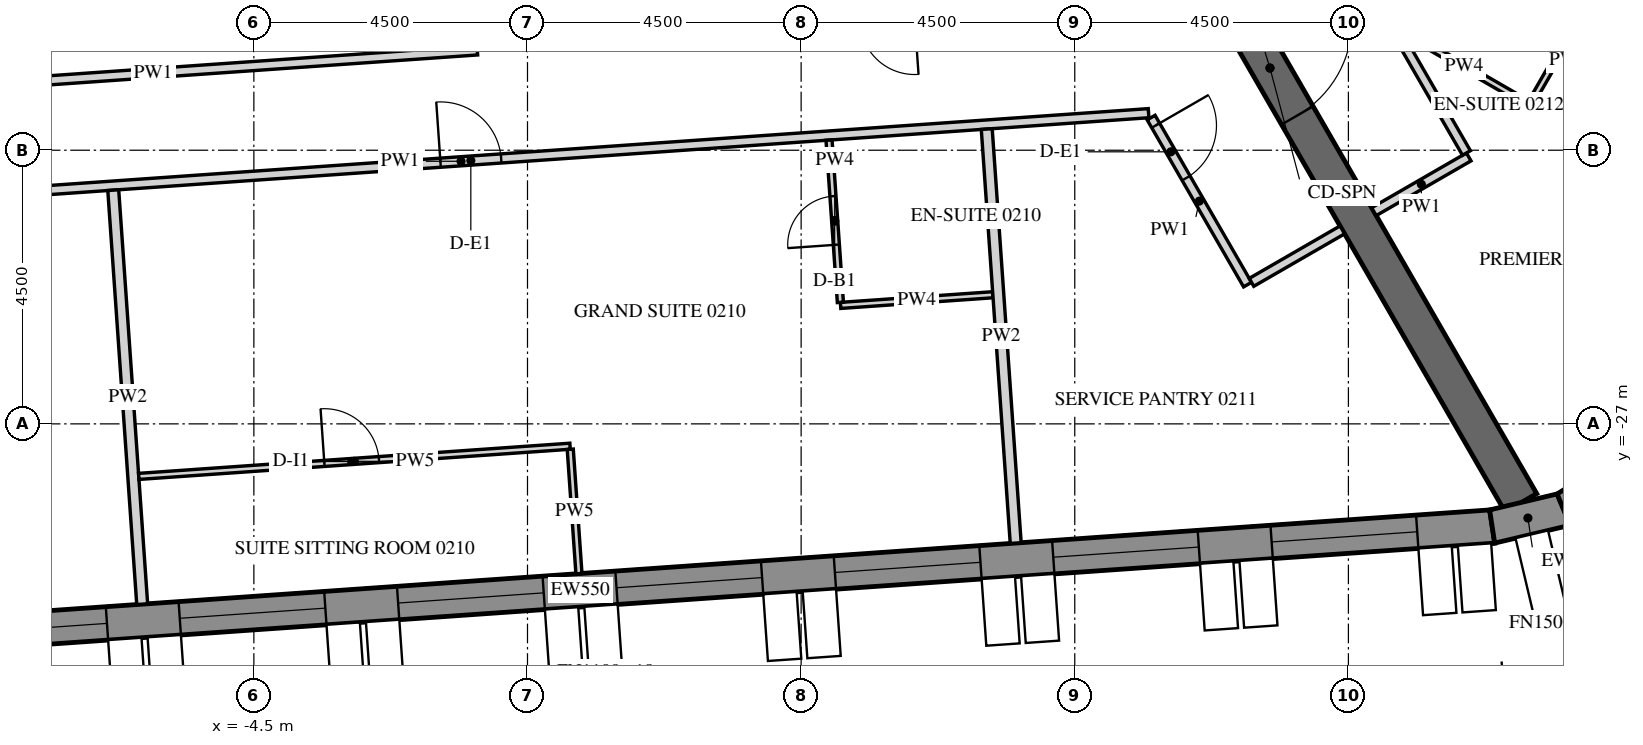
"""IFC4 building model, lengths in metres.
Left out: names, types, materials, properties, quantities, classifications, styles, units other than length and angle.
Written with IfcOpenShell. Run it as: python <this file> out.ifc"""

import sys

from ifc_helpers import new_model, si_unit, direction, frame, frame_2d, origin, place, context, subcontext, project, spatial, polyline, rectangle, outline, extrude, element, fill, save


model = new_model("IFC4")
c1 = context("Model", 3, precision=1e-05, world=origin(), true_north=direction((0.0, 1.0)))
c2 = subcontext(c1, "Body", "Model", "MODEL_VIEW")
j1 = project(units=[si_unit("LENGTHUNIT", "METRE"), si_unit("PLANEANGLEUNIT", "RADIAN")], contexts=[c1])
p1 = place(None, origin())
s1 = spatial("IfcSite", under=j1, at=p1, CompositionType="ELEMENT")
p2 = place(p1, origin())
s2 = spatial("IfcBuilding", under=s1, at=p2, CompositionType="ELEMENT")
p3 = place(p2, frame((0.0, 0.0, 49.2)))
s3 = spatial("IfcBuildingStorey", under=s2, at=p3, CompositionType="ELEMENT", Elevation=49.2)
p4 = place(p3, frame((-14.134, -30.786, -0.15), z_axis=(0.0, 0.0, 1.0), x_axis=(0.997564037441, 0.069756657061, 0.0)))
e1 = element("IfcWall", 1, at=p4, inside=s3, PredefinedType="SOLIDWALL", context=c2, shape_type="SweptSolid", body=[
    extrude(outline(polyline([(-0.026, -0.275), (30.094, -0.275), (30.049, 0.275), (0.026, 0.275), (-0.026, -0.275)])), origin(), (0.0, 0.0, 1.0), 3.9),
])
p5 = place(p4, frame((1.236, 0.0, 1.05)))
e2 = element("IfcOpeningElement", 2, at=p5, cuts=e1, PredefinedType="OPENING", context=c2, shape_type="SweptSolid", body=[
    extrude(rectangle(XDim=2.4, YDim=2.4, at=frame_2d((1.2, 1.2))), frame((0.0, 0.285, 0.0), z_axis=(0.0, -1.0, 0.0), x_axis=(1.0, 0.0, 0.0)), (0.0, 0.0, 1.0), 0.57),
])
p6 = place(p4, frame((4.835, 0.0, 1.05)))
e3 = element("IfcOpeningElement", 3, at=p6, cuts=e1, PredefinedType="OPENING", context=c2, shape_type="SweptSolid", body=[
    extrude(rectangle(XDim=2.4, YDim=2.4, at=frame_2d((1.2, 1.2))), frame((0.0, 0.285, 0.0), z_axis=(0.0, -1.0, 0.0), x_axis=(1.0, 0.0, 0.0)), (0.0, 0.0, 1.0), 0.57),
])
p7 = place(p4, frame((8.436, 0.0, 1.05)))
e4 = element("IfcOpeningElement", 4, at=p7, cuts=e1, PredefinedType="OPENING", context=c2, shape_type="SweptSolid", body=[
    extrude(rectangle(XDim=2.4, YDim=2.4, at=frame_2d((1.2, 1.2))), frame((0.0, 0.285, 0.0), z_axis=(0.0, -1.0, 0.0), x_axis=(1.0, 0.0, 0.0)), (0.0, 0.0, 1.0), 0.57),
])
p8 = place(p4, frame((12.035, 0.0, 1.05)))
e5 = element("IfcOpeningElement", 5, at=p8, cuts=e1, PredefinedType="OPENING", context=c2, shape_type="SweptSolid", body=[
    extrude(rectangle(XDim=2.4, YDim=2.4, at=frame_2d((1.2, 1.2))), frame((0.0, 0.285, 0.0), z_axis=(0.0, -1.0, 0.0), x_axis=(1.0, 0.0, 0.0)), (0.0, 0.0, 1.0), 0.57),
])
p9 = place(p4, frame((15.635, 0.0, 1.05)))
e6 = element("IfcOpeningElement", 6, at=p9, cuts=e1, PredefinedType="OPENING", context=c2, shape_type="SweptSolid", body=[
    extrude(rectangle(XDim=2.4, YDim=2.4, at=frame_2d((1.2, 1.2))), frame((0.0, 0.285, 0.0), z_axis=(0.0, -1.0, 0.0), x_axis=(1.0, 0.0, 0.0)), (0.0, 0.0, 1.0), 0.57),
])
p10 = place(p4, frame((19.236, 0.0, 1.05)))
e7 = element("IfcOpeningElement", 7, at=p10, cuts=e1, PredefinedType="OPENING", context=c2, shape_type="SweptSolid", body=[
    extrude(rectangle(XDim=2.4, YDim=2.4, at=frame_2d((1.2, 1.2))), frame((0.0, 0.285, 0.0), z_axis=(0.0, -1.0, 0.0), x_axis=(1.0, 0.0, 0.0)), (0.0, 0.0, 1.0), 0.57),
])
p11 = place(p4, frame((22.835, 0.0, 1.05)))
e8 = element("IfcOpeningElement", 8, at=p11, cuts=e1, PredefinedType="OPENING", context=c2, shape_type="SweptSolid", body=[
    extrude(rectangle(XDim=2.4, YDim=2.4, at=frame_2d((1.2, 1.2))), frame((0.0, 0.285, 0.0), z_axis=(0.0, -1.0, 0.0), x_axis=(1.0, 0.0, 0.0)), (0.0, 0.0, 1.0), 0.57),
])
p12 = place(p4, frame((26.436, 0.0, 1.05)))
e9 = element("IfcOpeningElement", 9, at=p12, cuts=e1, PredefinedType="OPENING", context=c2, shape_type="SweptSolid", body=[
    extrude(rectangle(XDim=2.4, YDim=2.4, at=frame_2d((1.2, 1.2))), frame((0.0, 0.285, 0.0), z_axis=(0.0, -1.0, 0.0), x_axis=(1.0, 0.0, 0.0)), (0.0, 0.0, 1.0), 0.57),
])
p13 = place(p3, frame((15.864, -28.688, -0.15), z_axis=(0.0, 0.0, 1.0), x_axis=(0.973063591128, 0.230536868247, 0.0)))
e10 = element("IfcWall", 10, at=p13, inside=s3, PredefinedType="SOLIDWALL", context=c2, shape_type="SweptSolid", body=[
    extrude(outline(polyline([(-0.022, -0.275), (1.253, -0.275), (1.163, 0.275), (0.022, 0.275), (-0.022, -0.275)])), origin(), (0.0, 0.0, 1.0), 3.9),
])
p14 = place(p3, frame((17.04, -28.41, -0.15), z_axis=(0.0, 0.0, 1.0), x_axis=(0.847952888306, 0.530071598195, 0.0)))
e11 = element("IfcWall", 11, at=p14, inside=s3, PredefinedType="SOLIDWALL", context=c2, shape_type="SweptSolid", body=[
    extrude(outline(polyline([(-0.045, -0.275), (1.253, -0.275), (1.163, 0.275), (0.045, 0.275), (-0.045, -0.275)])), origin(), (0.0, 0.0, 1.0), 3.9),
])
p15 = place(p3, frame((8.083, -14.0, -0.15), z_axis=(0.0, 0.0, 1.0), x_axis=(0.499997680643, -0.866026742862, 0.0)))
e12 = element("IfcWall", 12, at=p15, inside=s3, PredefinedType="SHEAR", context=c2, shape_type="SweptSolid", body=[
    extrude(rectangle(XDim=16.509, YDim=0.6, at=frame_2d((8.254, 0.0))), origin(), (0.0, 0.0, 1.0), 3.9),
])
p16 = place(p15, frame((7.354, 0.0, 0.15)))
e13 = element("IfcOpeningElement", 13, at=p16, cuts=e12, PredefinedType="OPENING", context=c2, shape_type="SweptSolid", body=[
    extrude(rectangle(XDim=1.8, YDim=2.4, at=frame_2d((0.9, 1.2))), frame((0.0, 0.31, 0.0), z_axis=(0.0, -1.0, 0.0), x_axis=(1.0, 0.0, 0.0)), (0.0, 0.0, 1.0), 0.62),
])
p17 = place(p3, frame((-12.4, -23.472, 0.0), z_axis=(0.0, 0.0, 1.0), x_axis=(0.997564133303, 0.069755286163, 0.0)))
e14 = element("IfcWall", 14, at=p17, inside=s3, PredefinedType="PARTITIONING", context=c2, shape_type="SweptSolid", body=[
    extrude(rectangle(XDim=22.669, YDim=0.15, at=frame_2d((11.334, 0.0))), origin(), (0.0, 0.0, 1.0), 2.988),
])
p18 = place(p17, frame((3.556, 0.0, 0.0)))
e15 = element("IfcOpeningElement", 15, at=p18, cuts=e14, PredefinedType="OPENING", context=c2, shape_type="SweptSolid", body=[
    extrude(rectangle(XDim=1.0, YDim=2.1, at=frame_2d((0.5, 1.05))), frame((0.0, 0.085, 0.0), z_axis=(0.0, -1.0, 0.0), x_axis=(1.0, 0.0, 0.0)), (0.0, 0.0, 1.0), 0.17),
])
p19 = place(p17, frame((10.996, 0.0, 0.0)))
e16 = element("IfcOpeningElement", 16, at=p19, cuts=e14, PredefinedType="OPENING", context=c2, shape_type="SweptSolid", body=[
    extrude(rectangle(XDim=1.0, YDim=2.1, at=frame_2d((0.5, 1.05))), frame((0.0, 0.085, 0.0), z_axis=(0.0, -1.0, 0.0), x_axis=(1.0, 0.0, 0.0)), (0.0, 0.0, 1.0), 0.17),
])
p20 = place(p3, frame((10.256, -21.963, 0.0), z_axis=(0.0, 0.0, 1.0), x_axis=(0.499980071345, -0.866036909293, 0.0)))
e17 = element("IfcWall", 17, at=p20, inside=s3, PredefinedType="PARTITIONING", context=c2, shape_type="SweptSolid", body=[
    extrude(rectangle(XDim=3.172, YDim=0.15, at=frame_2d((1.586, 0.0))), origin(), (0.0, 0.0, 1.0), 2.988),
])
p21 = place(p20, frame((0.15, 0.0, 0.0)))
e18 = element("IfcOpeningElement", 18, at=p21, cuts=e17, PredefinedType="OPENING", context=c2, shape_type="SweptSolid", body=[
    extrude(rectangle(XDim=1.0, YDim=2.1, at=frame_2d((0.5, 1.05))), frame((0.0, 0.085, 0.0), z_axis=(0.0, -1.0, 0.0), x_axis=(1.0, 0.0, 0.0)), (0.0, 0.0, 1.0), 0.17),
])
p22 = place(p3, frame((11.906, -24.673, 0.0), z_axis=(0.0, 0.0, 1.0), x_axis=(0.866013532718, 0.500020560727, 0.0)))
e19 = element("IfcWall", 19, at=p22, inside=s3, PredefinedType="PARTITIONING", context=c2, shape_type="SweptSolid", body=[
    extrude(rectangle(XDim=1.725, YDim=0.15, at=frame_2d((0.863, 0.0))), origin(), (0.0, 0.0, 1.0), 2.988),
])
p23 = place(p3, frame((-0.825, -20.858, 0.0), z_axis=(0.0, 0.0, 1.0), x_axis=(-0.997563801863, -0.069760025895, 0.0)))
e20 = element("IfcWall", 20, at=p23, inside=s3, PredefinedType="PARTITIONING", context=c2, shape_type="SweptSolid", body=[
    extrude(rectangle(XDim=10.688, YDim=0.15, at=frame_2d((5.344, 0.0))), origin(), (0.0, 0.0, 1.0), 2.988),
])
p24 = place(p3, frame((13.92, -23.51, 0.0), z_axis=(0.0, 0.0, 1.0), x_axis=(0.866047807691, 0.499961193289, 0.0)))
e21 = element("IfcWall", 21, at=p24, inside=s3, PredefinedType="PARTITIONING", context=c2, shape_type="SweptSolid", body=[
    extrude(rectangle(XDim=1.8, YDim=0.15, at=frame_2d((0.9, 0.0))), origin(), (0.0, 0.0, 1.0), 2.988),
])
p25 = place(p3, frame((15.441, -22.545, 0.0), z_axis=(0.0, 0.0, 1.0), x_axis=(-0.500013622142, 0.866017538894, 0.0)))
e22 = element("IfcWall", 22, at=p25, inside=s3, PredefinedType="PARTITIONING", context=c2, shape_type="SweptSolid", body=[
    extrude(rectangle(XDim=2.419, YDim=0.15, at=frame_2d((1.21, 0.0))), origin(), (0.0, 0.0, 1.0), 2.988),
])
p26 = place(p3, frame((-6.336, -29.965, 0.0), z_axis=(0.0, 0.0, 1.0), x_axis=(-0.069790326764, 0.997561682449, 0.0)))
e23 = element("IfcWall", 23, at=p26, inside=s3, PredefinedType="PARTITIONING", context=c2, shape_type="SweptSolid", body=[
    extrude(rectangle(XDim=6.825, YDim=0.18, at=frame_2d((3.413, 0.0))), origin(), (0.0, 0.0, 1.0), 2.988),
])
p27 = place(p3, frame((7.653, -24.877, 0.0), z_axis=(0.0, 0.0, 1.0), x_axis=(-0.997565196586, -0.069740078583, 0.0)))
e24 = element("IfcWall", 24, at=p27, inside=s3, PredefinedType="PARTITIONING", context=c2, shape_type="SweptSolid", body=[
    extrude(rectangle(XDim=2.51, YDim=0.1, at=frame_2d((1.255, 0.0))), origin(), (0.0, 0.0, 1.0), 2.988),
])
p28 = place(p3, frame((5.146, -25.002, 0.0), z_axis=(0.0, 0.0, 1.0), x_axis=(-0.069729221413, 0.997565955554, 0.0)))
e25 = element("IfcWall", 25, at=p28, inside=s3, PredefinedType="PARTITIONING", context=c2, shape_type="SweptSolid", body=[
    extrude(rectangle(XDim=2.675, YDim=0.1, at=frame_2d((1.337, 0.0))), origin(), (0.0, 0.0, 1.0), 2.988),
])
p29 = place(p28, frame((0.95, 0.0, 0.0)))
e26 = element("IfcOpeningElement", 26, at=p29, cuts=e25, PredefinedType="OPENING", context=c2, shape_type="SweptSolid", body=[
    extrude(rectangle(XDim=0.8, YDim=2.1, at=frame_2d((0.4, 1.05))), frame((0.0, 0.06, 0.0), z_axis=(0.0, -1.0, 0.0), x_axis=(1.0, 0.0, 0.0)), (0.0, 0.0, 1.0), 0.12),
])
p30 = place(p3, frame((-6.393, -27.864, 0.0), z_axis=(0.0, 0.0, 1.0), x_axis=(0.997565277642, 0.069738919141, 0.0)))
e27 = element("IfcWall", 27, at=p30, inside=s3, PredefinedType="PARTITIONING", context=c2, shape_type="SweptSolid", body=[
    extrude(rectangle(XDim=7.11, YDim=0.1, at=frame_2d((3.555, 0.0))), origin(), (0.0, 0.0, 1.0), 2.988),
])
p31 = place(p30, frame((3.06, 0.0, 0.0)))
e28 = element("IfcOpeningElement", 28, at=p31, cuts=e27, PredefinedType="OPENING", context=c2, shape_type="SweptSolid", body=[
    extrude(rectangle(XDim=0.9, YDim=2.1, at=frame_2d((0.45, 1.05))), frame((0.0, 0.06, 0.0), z_axis=(0.0, -1.0, 0.0), x_axis=(1.0, 0.0, 0.0)), (0.0, 0.0, 1.0), 0.12),
])
p32 = place(p3, frame((0.703, -27.418, 0.0), z_axis=(0.0, 0.0, 1.0), x_axis=(0.069791202247, -0.997561621199, 0.0)))
e29 = element("IfcWall", 29, at=p32, inside=s3, PredefinedType="PARTITIONING", context=c2, shape_type="SweptSolid", body=[
    extrude(rectangle(XDim=2.05, YDim=0.1, at=frame_2d((1.025, 0.0))), origin(), (0.0, 0.0, 1.0), 2.988),
])
p33 = place(p3, frame((8.029, -28.96, 0.0), z_axis=(0.0, 0.0, 1.0), x_axis=(-0.069754729296, 0.997564172242, 0.0)))
e30 = element("IfcWall", 30, at=p33, inside=s3, PredefinedType="PARTITIONING", context=c2, shape_type="SweptSolid", body=[
    extrude(rectangle(XDim=6.825, YDim=0.18, at=frame_2d((3.413, 0.0))), origin(), (0.0, 0.0, 1.0), 2.988),
])
p34 = place(p3, frame((17.758, -19.542, 0.0), z_axis=(0.0, 0.0, 1.0), x_axis=(-0.499990435942, -0.866030925526, 0.0)))
e31 = element("IfcWall", 31, at=p34, inside=s3, PredefinedType="PARTITIONING", context=c2, shape_type="SweptSolid", body=[
    extrude(rectangle(XDim=2.55, YDim=0.1, at=frame_2d((1.275, 0.0))), origin(), (0.0, 0.0, 1.0), 2.988),
])
p35 = place(p3, frame((16.44, -21.725, 0.0), z_axis=(0.0, 0.0, 1.0), x_axis=(-0.865980596518, 0.500077600433, 0.0)))
e32 = element("IfcWall", 32, at=p35, inside=s3, PredefinedType="PARTITIONING", context=c2, shape_type="SweptSolid", body=[
    extrude(rectangle(XDim=2.4, YDim=0.1, at=frame_2d((1.2, 0.0))), origin(), (0.0, 0.0, 1.0), 2.988),
])
p36 = place(p6, frame((0.0, 0.205, 0.0)))
e33 = element("IfcWindow", 33, at=p36, inside=s3, PartitioningType="DOUBLE_PANEL_VERTICAL", PredefinedType="WINDOW", context=c2, shape_type="SweptSolid", body=[
    extrude(rectangle(XDim=2.4, YDim=2.4, at=frame_2d((1.2, 1.2))), frame((0.0, 0.03, 0.0), z_axis=(0.0, -1.0, 0.0), x_axis=(1.0, 0.0, 0.0)), (0.0, 0.0, 1.0), 0.06),
])
fill(e3, e33)
p37 = place(p7, frame((0.0, 0.205, 0.0)))
e34 = element("IfcWindow", 34, at=p37, inside=s3, PartitioningType="DOUBLE_PANEL_VERTICAL", PredefinedType="WINDOW", context=c2, shape_type="SweptSolid", body=[
    extrude(rectangle(XDim=2.4, YDim=2.4, at=frame_2d((1.2, 1.2))), frame((0.0, 0.03, 0.0), z_axis=(0.0, -1.0, 0.0), x_axis=(1.0, 0.0, 0.0)), (0.0, 0.0, 1.0), 0.06),
])
fill(e4, e34)
p38 = place(p8, frame((0.0, 0.205, 0.0)))
e35 = element("IfcWindow", 35, at=p38, inside=s3, PartitioningType="DOUBLE_PANEL_VERTICAL", PredefinedType="WINDOW", context=c2, shape_type="SweptSolid", body=[
    extrude(rectangle(XDim=2.4, YDim=2.4, at=frame_2d((1.2, 1.2))), frame((0.0, 0.03, 0.0), z_axis=(0.0, -1.0, 0.0), x_axis=(1.0, 0.0, 0.0)), (0.0, 0.0, 1.0), 0.06),
])
fill(e5, e35)
p39 = place(p9, frame((0.0, 0.205, 0.0)))
e36 = element("IfcWindow", 36, at=p39, inside=s3, PartitioningType="DOUBLE_PANEL_VERTICAL", PredefinedType="WINDOW", context=c2, shape_type="SweptSolid", body=[
    extrude(rectangle(XDim=2.4, YDim=2.4, at=frame_2d((1.2, 1.2))), frame((0.0, 0.03, 0.0), z_axis=(0.0, -1.0, 0.0), x_axis=(1.0, 0.0, 0.0)), (0.0, 0.0, 1.0), 0.06),
])
fill(e6, e36)
p40 = place(p10, frame((0.0, 0.205, 0.0)))
e37 = element("IfcWindow", 37, at=p40, inside=s3, PartitioningType="DOUBLE_PANEL_VERTICAL", PredefinedType="WINDOW", context=c2, shape_type="SweptSolid", body=[
    extrude(rectangle(XDim=2.4, YDim=2.4, at=frame_2d((1.2, 1.2))), frame((0.0, 0.03, 0.0), z_axis=(0.0, -1.0, 0.0), x_axis=(1.0, 0.0, 0.0)), (0.0, 0.0, 1.0), 0.06),
])
fill(e7, e37)
p41 = place(p11, frame((0.0, 0.205, 0.0)))
e38 = element("IfcWindow", 38, at=p41, inside=s3, PartitioningType="DOUBLE_PANEL_VERTICAL", PredefinedType="WINDOW", context=c2, shape_type="SweptSolid", body=[
    extrude(rectangle(XDim=2.4, YDim=2.4, at=frame_2d((1.2, 1.2))), frame((0.0, 0.03, 0.0), z_axis=(0.0, -1.0, 0.0), x_axis=(1.0, 0.0, 0.0)), (0.0, 0.0, 1.0), 0.06),
])
fill(e8, e38)
p42 = place(p12, frame((0.0, 0.205, 0.0)))
e39 = element("IfcWindow", 39, at=p42, inside=s3, PartitioningType="DOUBLE_PANEL_VERTICAL", PredefinedType="WINDOW", context=c2, shape_type="SweptSolid", body=[
    extrude(rectangle(XDim=2.4, YDim=2.4, at=frame_2d((1.2, 1.2))), frame((0.0, 0.03, 0.0), z_axis=(0.0, -1.0, 0.0), x_axis=(1.0, 0.0, 0.0)), (0.0, 0.0, 1.0), 0.06),
])
fill(e9, e39)
p43 = place(p16, origin())
e40 = element("IfcDoor", 40, at=p43, inside=s3, OperationType="DOUBLE_DOOR_SINGLE_SWING", PredefinedType="DOOR", context=c2, shape_type="SweptSolid", body=[
    extrude(rectangle(XDim=1.8, YDim=2.4, at=frame_2d((0.9, 1.2))), frame((0.0, 0.025, 0.0), z_axis=(0.0, -1.0, 0.0), x_axis=(1.0, 0.0, 0.0)), (0.0, 0.0, 1.0), 0.05),
])
fill(e13, e40)
p44 = place(p19, origin())
e41 = element("IfcDoor", 41, at=p44, inside=s3, OperationType="SINGLE_SWING_RIGHT", PredefinedType="DOOR", context=c2, shape_type="SweptSolid", body=[
    extrude(rectangle(XDim=1.0, YDim=2.1, at=frame_2d((0.5, 1.05))), frame((0.0, 0.025, 0.0), z_axis=(0.0, -1.0, 0.0), x_axis=(1.0, 0.0, 0.0)), (0.0, 0.0, 1.0), 0.05),
])
fill(e16, e41)
p45 = place(p29, origin())
e42 = element("IfcDoor", 42, at=p45, inside=s3, OperationType="SINGLE_SWING_RIGHT", PredefinedType="DOOR", context=c2, shape_type="SweptSolid", body=[
    extrude(rectangle(XDim=0.8, YDim=2.1, at=frame_2d((0.4, 1.05))), frame((0.0, 0.025, 0.0), z_axis=(0.0, -1.0, 0.0), x_axis=(1.0, 0.0, 0.0)), (0.0, 0.0, 1.0), 0.05),
])
fill(e26, e42)
p46 = place(p31, origin())
e43 = element("IfcDoor", 43, at=p46, inside=s3, OperationType="SINGLE_SWING_RIGHT", PredefinedType="DOOR", context=c2, shape_type="SweptSolid", body=[
    extrude(rectangle(XDim=0.9, YDim=2.1, at=frame_2d((0.45, 1.05))), frame((0.0, 0.025, 0.0), z_axis=(0.0, -1.0, 0.0), x_axis=(1.0, 0.0, 0.0)), (0.0, 0.0, 1.0), 0.05),
])
fill(e28, e43)
p47 = place(p21, origin())
e44 = element("IfcDoor", 44, at=p47, inside=s3, OperationType="SINGLE_SWING_RIGHT", PredefinedType="DOOR", context=c2, shape_type="SweptSolid", body=[
    extrude(rectangle(XDim=1.0, YDim=2.1, at=frame_2d((0.5, 1.05))), frame((0.0, 0.025, 0.0), z_axis=(0.0, -1.0, 0.0), x_axis=(1.0, 0.0, 0.0)), (0.0, 0.0, 1.0), 0.05),
])
fill(e18, e44)
save(model, sys.argv[1])
